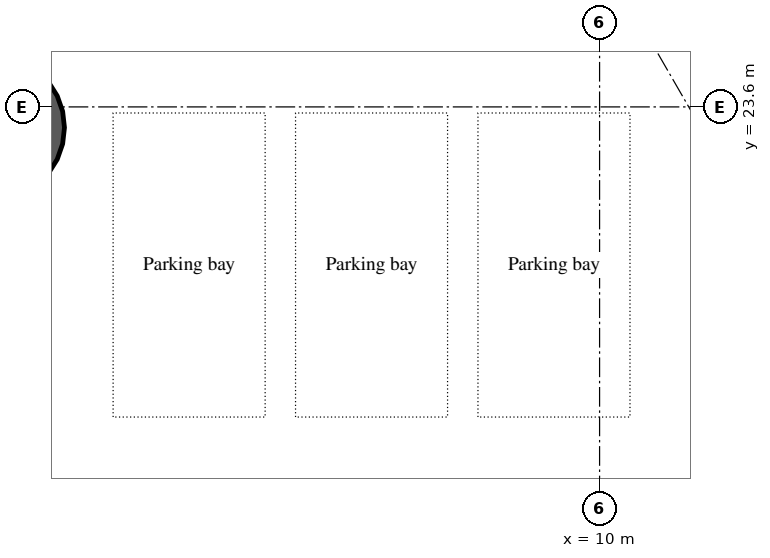
"""IFC4 building model, lengths in metres.
Left out: names, types, materials, properties, quantities, classifications, styles, units other than length and angle.
Written with IfcOpenShell. Run it as: python <this file> out.ifc"""

import sys

from ifc_helpers import new_model, si_unit, direction, frame, origin, origin_2d, place, context, subcontext, project, spatial, hollow_circle, extrude, element, save


model = new_model("IFC4")
c1 = context("Model", 3, precision=1e-05, world=origin(), true_north=direction((0.0, 1.0)))
c2 = subcontext(c1, "Body", "Model", "MODEL_VIEW")
j1 = project(units=[si_unit("LENGTHUNIT", "METRE"), si_unit("PLANEANGLEUNIT", "RADIAN")], contexts=[c1])
p1 = place(None, origin())
s1 = spatial("IfcSite", under=j1, at=p1, CompositionType="ELEMENT")
p2 = place(p1, origin())
s2 = spatial("IfcBuilding", under=s1, at=p2, CompositionType="ELEMENT")
p3 = place(p2, frame((0.0, 0.0, -8.4)))
s3 = spatial("IfcBuildingStorey", under=s2, at=p3, CompositionType="ELEMENT", Elevation=-8.4)
p4 = place(p3, frame((0.0, 23.26, 0.0), z_axis=(0.0, 0.0, 1.0), x_axis=(1.0, 0.0, 0.0)))
e1 = element("IfcColumn", 1, at=p4, inside=s3, PredefinedType="COLUMN", context=c2, shape_type="SweptSolid", body=[
    extrude(hollow_circle(Radius=1.2, WallThickness=0.06, at=origin_2d()), origin(), (0.0, 0.0, 1.0), 3.82),
])
save(model, sys.argv[1])
